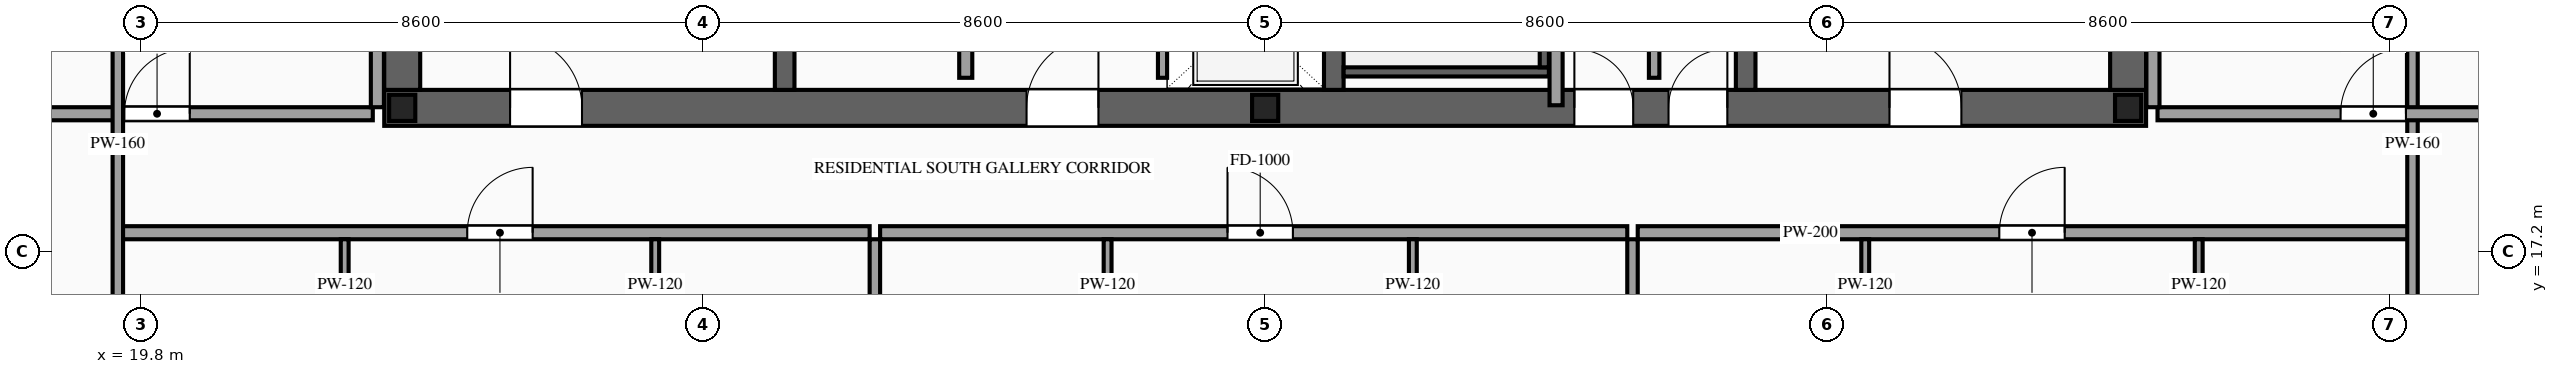
"""IFC4 building model, lengths in metres.
Left out: names, types, materials, properties, quantities, classifications, styles, units other than length and angle.
Written with IfcOpenShell. Run it as: python <this file> out.ifc"""

import sys

from ifc_helpers import new_model, si_unit, direction, frame, frame_2d, origin, origin_2d, place, context, subcontext, project, spatial, rectangle, i_section, extrude, source, transform, mapped, element, fill, save


model = new_model("IFC4")
c1 = context("Model", 3, precision=1e-05, world=origin(), true_north=direction((0.0, 1.0)))
c2 = subcontext(c1, "Body", "Model", "MODEL_VIEW")
j1 = project(units=[si_unit("LENGTHUNIT", "METRE"), si_unit("PLANEANGLEUNIT", "RADIAN")], contexts=[c1])
p1 = place(None, origin())
s1 = spatial("IfcSite", under=j1, at=p1, CompositionType="ELEMENT")
p2 = place(p1, origin())
s2 = spatial("IfcBuilding", under=s1, at=p2, CompositionType="ELEMENT")
p3 = place(p2, frame((0.0, 0.0, 234.6)))
s3 = spatial("IfcBuildingStorey", under=s2, at=p3, CompositionType="ELEMENT", Elevation=234.6)
p4 = place(p3, frame((23.525, 19.4, 0.0), z_axis=(0.0, 0.0, 1.0), x_axis=(1.0, 0.0, 0.0)))
e1 = element("IfcWall", 1, at=p4, inside=s3, PredefinedType="SHEAR", context=c2, shape_type="SweptSolid", body=[
    extrude(rectangle(XDim=26.95, YDim=0.55, at=frame_2d((13.475, 0.0))), origin(), (0.0, 0.0, 1.0), 3.5),
])
p5 = place(p4, frame((1.925, 0.0, 0.0)))
e2 = element("IfcOpeningElement", 2, at=p5, cuts=e1, PredefinedType="OPENING", context=c2, shape_type="SweptSolid", body=[
    extrude(rectangle(XDim=1.1, YDim=2.2, at=frame_2d((0.55, 1.1))), frame((0.0, 0.29, 0.0), z_axis=(0.0, -1.0, 0.0), x_axis=(1.0, 0.0, 0.0)), (0.0, 0.0, 1.0), 0.58),
])
p6 = place(p4, frame((9.825, 0.0, 0.0)))
e3 = element("IfcOpeningElement", 3, at=p6, cuts=e1, PredefinedType="OPENING", context=c2, shape_type="SweptSolid", body=[
    extrude(rectangle(XDim=1.1, YDim=2.2, at=frame_2d((0.55, 1.1))), frame((0.0, 0.29, 0.0), z_axis=(0.0, -1.0, 0.0), x_axis=(1.0, 0.0, 0.0)), (0.0, 0.0, 1.0), 0.58),
])
p7 = place(p4, frame((23.025, 0.0, 0.0)))
e4 = element("IfcOpeningElement", 4, at=p7, cuts=e1, PredefinedType="OPENING", context=c2, shape_type="SweptSolid", body=[
    extrude(rectangle(XDim=1.1, YDim=2.2, at=frame_2d((0.55, 1.1))), frame((0.0, 0.29, 0.0), z_axis=(0.0, -1.0, 0.0), x_axis=(1.0, 0.0, 0.0)), (0.0, 0.0, 1.0), 0.58),
])
p8 = place(p4, frame((19.645, 0.0, 0.0)))
e5 = element("IfcOpeningElement", 5, at=p8, cuts=e1, PredefinedType="OPENING", context=c2, shape_type="SweptSolid", body=[
    extrude(rectangle(XDim=0.9, YDim=2.15, at=frame_2d((0.45, 1.075))), frame((0.0, 0.29, 0.0), z_axis=(0.0, -1.0, 0.0), x_axis=(1.0, 0.0, 0.0)), (0.0, 0.0, 1.0), 0.58),
])
p9 = place(p4, frame((18.205, 0.0, 0.0)))
e6 = element("IfcOpeningElement", 6, at=p9, cuts=e1, PredefinedType="OPENING", context=c2, shape_type="SweptSolid", body=[
    extrude(rectangle(XDim=0.9, YDim=2.15, at=frame_2d((0.45, 1.075))), frame((0.0, 0.29, 0.0), z_axis=(0.0, -1.0, 0.0), x_axis=(1.0, 0.0, 0.0)), (0.0, 0.0, 1.0), 0.58),
])
m1 = source(origin(), c2, "Body", "SweptSolid", [
    extrude(rectangle(XDim=12.25, YDim=0.55, at=frame_2d((6.125, 0.0))), origin(), (0.0, 0.0, 1.0), 3.5),
])
for number, where, z_axis, x_axis in (
    (7, (23.8, 19.675, 0.0), (0.0, 0.0, 1.0), (0.0, 1.0, 0.0)),
    (8, (50.2, 19.675, 0.0), (0.0, 0.0, 1.0), (0.0, 1.0, 0.0)),
):
    element("IfcWall", number, at=place(p3, frame(where, z_axis=z_axis, x_axis=x_axis)), inside=s3, PredefinedType="SHEAR", context=c2, shape_type="MappedRepresentation", body=[
        mapped(m1, transform((0.0, 0.0, 0.0), scale=1.0)),
    ])
m2 = source(origin(), c2, "Body", "SweptSolid", [
    extrude(rectangle(XDim=12.25, YDim=0.3, at=frame_2d((6.125, 0.0))), origin(), (0.0, 0.0, 1.0), 3.5),
])
for number, where, z_axis, x_axis in (
    (9, (29.65, 19.675, 0.0), (0.0, 0.0, 1.0), (0.0, 1.0, 0.0)),
    (10, (38.05, 19.675, 0.0), (0.0, 0.0, 1.0), (0.0, 1.0, 0.0)),
    (11, (44.35, 19.675, 0.0), (0.0, 0.0, 1.0), (0.0, 1.0, 0.0)),
):
    element("IfcWall", number, at=place(p3, frame(where, z_axis=z_axis, x_axis=x_axis)), inside=s3, PredefinedType="SOLIDWALL", context=c2, shape_type="MappedRepresentation", body=[
        mapped(m2, transform((0.0, 0.0, 0.0), scale=1.0)),
    ])
m3 = source(origin(), c2, "Body", "SweptSolid", [
    extrude(i_section(OverallWidth=0.4, OverallDepth=0.4, WebThickness=0.013, FlangeThickness=0.021, at=origin_2d()), origin(), (0.0, 0.0, 1.0), 3.5),
])
for number, where, z_axis, x_axis in (
    (12, (23.8, 19.4, 0.0), (0.0, 0.0, 1.0), (1.0, 0.0, 0.0)),
    (13, (37.0, 19.4, 0.0), (0.0, 0.0, 1.0), (1.0, 0.0, 0.0)),
    (14, (50.2, 19.4, 0.0), (0.0, 0.0, 1.0), (1.0, 0.0, 0.0)),
):
    element("IfcColumn", number, at=place(p3, frame(where, z_axis=z_axis, x_axis=x_axis)), inside=s3, PredefinedType="COLUMN", context=c2, shape_type="MappedRepresentation", body=[
        mapped(m3, transform((0.0, 0.0, 0.0), scale=1.0)),
    ])
p10 = place(p3, frame((35.43, 19.86, 0.0), z_axis=(0.0, 0.0, 1.0), x_axis=(0.0, 1.0, 0.0)))
e15 = element("IfcWall", 15, at=p10, inside=s3, PredefinedType="SOLIDWALL", context=c2, shape_type="SweptSolid", body=[
    extrude(rectangle(XDim=2.04, YDim=0.14, at=frame_2d((1.02, 0.0))), origin(), (0.0, 0.0, 1.0), 3.28),
])
p11 = place(p10, frame((0.47, 0.0, 0.0)))
e16 = element("IfcOpeningElement", 16, at=p11, cuts=e15, PredefinedType="OPENING", context=c2, shape_type="SweptSolid", body=[
    extrude(rectangle(XDim=1.1, YDim=2.2, at=frame_2d((0.55, 1.1))), frame((0.0, 0.085, 0.0), z_axis=(0.0, -1.0, 0.0), x_axis=(1.0, 0.0, 0.0)), (0.0, 0.0, 1.0), 0.17),
])
m4 = source(origin(), c2, "Body", "SweptSolid", [
    extrude(rectangle(XDim=3.14, YDim=0.14, at=frame_2d((1.57, 0.0))), origin(), (0.0, 0.0, 1.0), 3.28),
])
p12 = place(p3, frame((38.2, 19.95, 0.0), z_axis=(0.0, 0.0, 1.0), x_axis=(1.0, 0.0, 0.0)))
e17 = element("IfcWall", 17, at=p12, inside=s3, PredefinedType="SOLIDWALL", context=c2, shape_type="MappedRepresentation", body=[
    mapped(m4, transform((0.0, 0.0, 0.0), scale=1.0)),
])
m5 = source(origin(), c2, "Body", "SweptSolid", [
    extrude(rectangle(XDim=8.94, YDim=0.14, at=frame_2d((4.47, 0.0))), origin(), (0.0, 0.0, 1.0), 3.28),
])
p13 = place(p3, frame((41.27, 20.02, 0.0), z_axis=(0.0, 0.0, 1.0), x_axis=(0.0, 1.0, 0.0)))
e18 = element("IfcWall", 18, at=p13, inside=s3, PredefinedType="SOLIDWALL", context=c2, shape_type="MappedRepresentation", body=[
    mapped(m5, transform((0.0, 0.0, 0.0), scale=1.0)),
])
p14 = place(p3, frame((32.42, 19.86, 0.0), z_axis=(0.0, 0.0, 1.0), x_axis=(0.0, 1.0, 0.0)))
e19 = element("IfcWall", 19, at=p14, inside=s3, PredefinedType="PARTITIONING", context=c2, shape_type="SweptSolid", body=[
    extrude(rectangle(XDim=7.94, YDim=0.2, at=frame_2d((3.97, 0.0))), origin(), (0.0, 0.0, 1.0), 3.28),
])
p15 = place(p14, frame((3.52, 0.0, 0.0)))
e20 = element("IfcOpeningElement", 20, at=p15, cuts=e19, PredefinedType="OPENING", context=c2, shape_type="SweptSolid", body=[
    extrude(rectangle(XDim=0.9, YDim=2.15, at=frame_2d((0.45, 1.075))), frame((0.0, 0.115, 0.0), z_axis=(0.0, -1.0, 0.0), x_axis=(1.0, 0.0, 0.0)), (0.0, 0.0, 1.0), 0.23),
])
m6 = source(origin(), c2, "Body", "SweptSolid", [
    extrude(rectangle(XDim=1.34, YDim=0.16, at=frame_2d((0.67, 0.0))), origin(), (0.0, 0.0, 1.0), 3.28),
])
p16 = place(p3, frame((42.95, 19.86, 0.0), z_axis=(0.0, 0.0, 1.0), x_axis=(0.0, 1.0, 0.0)))
e21 = element("IfcWall", 21, at=p16, inside=s3, PredefinedType="PARTITIONING", context=c2, shape_type="MappedRepresentation", body=[
    mapped(m6, transform((0.0, 0.0, 0.0), scale=1.0)),
])
m7 = source(origin(), c2, "Body", "SweptSolid", [
    extrude(rectangle(XDim=6.51, YDim=0.2, at=frame_2d((3.255, 0.0))), origin(), (0.0, 0.0, 1.0), 3.28),
])
p17 = place(p3, frame((41.45, 19.44, 0.0), z_axis=(0.0, 0.0, 1.0), x_axis=(0.0, 1.0, 0.0)))
e22 = element("IfcWall", 22, at=p17, inside=s3, PredefinedType="PARTITIONING", context=c2, shape_type="MappedRepresentation", body=[
    mapped(m7, transform((0.0, 0.0, 0.0), scale=1.0)),
])
p18 = place(p3, frame((19.44, 17.49, 0.0), z_axis=(0.0, 0.0, 1.0), x_axis=(1.0, 0.0, 0.0)))
e23 = element("IfcWall", 23, at=p18, inside=s3, PredefinedType="PARTITIONING", context=c2, shape_type="SweptSolid", body=[
    extrude(rectangle(XDim=11.51, YDim=0.2, at=frame_2d((5.755, 0.0))), origin(), (0.0, 0.0, 1.0), 3.28),
])
p19 = place(p18, frame((5.355, 0.0, 0.0)))
e24 = element("IfcOpeningElement", 24, at=p19, cuts=e23, PredefinedType="OPENING", context=c2, shape_type="SweptSolid", body=[
    extrude(rectangle(XDim=1.0, YDim=2.2, at=frame_2d((0.5, 1.1))), frame((0.0, 0.115, 0.0), z_axis=(0.0, -1.0, 0.0), x_axis=(1.0, 0.0, 0.0)), (0.0, 0.0, 1.0), 0.23),
])
m8 = source(origin(), c2, "Body", "SweptSolid", [
    extrude(rectangle(XDim=12.04, YDim=0.16, at=frame_2d((6.02, 0.0))), origin(), (0.0, 0.0, 1.0), 3.28),
])
p20 = place(p3, frame((31.03, 5.35, 0.0), z_axis=(0.0, 0.0, 1.0), x_axis=(0.0, 1.0, 0.0)))
e25 = element("IfcWall", 25, at=p20, inside=s3, PredefinedType="PARTITIONING", context=c2, shape_type="MappedRepresentation", body=[
    mapped(m8, transform((0.0, 0.0, 0.0), scale=1.0)),
])
p21 = place(p3, frame((22.92, 13.28, 0.0), z_axis=(0.0, 0.0, 1.0), x_axis=(0.0, 1.0, 0.0)))
e26 = element("IfcWall", 26, at=p21, inside=s3, PredefinedType="PARTITIONING", context=c2, shape_type="SweptSolid", body=[
    extrude(rectangle(XDim=4.11, YDim=0.12, at=frame_2d((2.055, 0.0))), origin(), (0.0, 0.0, 1.0), 3.28),
])
p22 = place(p21, frame((1.63, 0.0, 0.0)))
e27 = element("IfcOpeningElement", 27, at=p22, cuts=e26, PredefinedType="OPENING", context=c2, shape_type="SweptSolid", body=[
    extrude(rectangle(XDim=0.85, YDim=2.1, at=frame_2d((0.425, 1.05))), frame((0.0, 0.075, 0.0), z_axis=(0.0, -1.0, 0.0), x_axis=(1.0, 0.0, 0.0)), (0.0, 0.0, 1.0), 0.15),
])
p23 = place(p3, frame((27.67, 13.28, 0.0), z_axis=(0.0, 0.0, 1.0), x_axis=(0.0, 1.0, 0.0)))
e28 = element("IfcWall", 28, at=p23, inside=s3, PredefinedType="PARTITIONING", context=c2, shape_type="SweptSolid", body=[
    extrude(rectangle(XDim=4.11, YDim=0.12, at=frame_2d((2.055, 0.0))), origin(), (0.0, 0.0, 1.0), 3.28),
])
p24 = place(p23, frame((1.63, 0.0, 0.0)))
e29 = element("IfcOpeningElement", 29, at=p24, cuts=e28, PredefinedType="OPENING", context=c2, shape_type="SweptSolid", body=[
    extrude(rectangle(XDim=0.85, YDim=2.1, at=frame_2d((0.425, 1.05))), frame((0.0, 0.075, 0.0), z_axis=(0.0, -1.0, 0.0), x_axis=(1.0, 0.0, 0.0)), (0.0, 0.0, 1.0), 0.15),
])
p25 = place(p3, frame((31.11, 17.49, 0.0), z_axis=(0.0, 0.0, 1.0), x_axis=(1.0, 0.0, 0.0)))
e30 = element("IfcWall", 30, at=p25, inside=s3, PredefinedType="PARTITIONING", context=c2, shape_type="SweptSolid", body=[
    extrude(rectangle(XDim=11.429, YDim=0.2, at=frame_2d((5.714, 0.0))), origin(), (0.0, 0.0, 1.0), 3.28),
])
p26 = place(p25, frame((5.314, 0.0, 0.0)))
e31 = element("IfcOpeningElement", 31, at=p26, cuts=e30, PredefinedType="OPENING", context=c2, shape_type="SweptSolid", body=[
    extrude(rectangle(XDim=1.0, YDim=2.2, at=frame_2d((0.5, 1.1))), frame((0.0, 0.115, 0.0), z_axis=(0.0, -1.0, 0.0), x_axis=(1.0, 0.0, 0.0)), (0.0, 0.0, 1.0), 0.23),
])
p27 = place(p3, frame((42.619, 5.35, 0.0), z_axis=(0.0, 0.0, 1.0), x_axis=(0.0, 1.0, 0.0)))
e32 = element("IfcWall", 32, at=p27, inside=s3, PredefinedType="PARTITIONING", context=c2, shape_type="MappedRepresentation", body=[
    mapped(m8, transform((0.0, 0.0, 0.0), scale=1.0)),
])
p28 = place(p3, frame((34.59, 13.28, 0.0), z_axis=(0.0, 0.0, 1.0), x_axis=(0.0, 1.0, 0.0)))
e33 = element("IfcWall", 33, at=p28, inside=s3, PredefinedType="PARTITIONING", context=c2, shape_type="SweptSolid", body=[
    extrude(rectangle(XDim=4.11, YDim=0.12, at=frame_2d((2.055, 0.0))), origin(), (0.0, 0.0, 1.0), 3.28),
])
p29 = place(p28, frame((1.63, 0.0, 0.0)))
e34 = element("IfcOpeningElement", 34, at=p29, cuts=e33, PredefinedType="OPENING", context=c2, shape_type="SweptSolid", body=[
    extrude(rectangle(XDim=0.85, YDim=2.1, at=frame_2d((0.425, 1.05))), frame((0.0, 0.075, 0.0), z_axis=(0.0, -1.0, 0.0), x_axis=(1.0, 0.0, 0.0)), (0.0, 0.0, 1.0), 0.15),
])
p30 = place(p3, frame((39.259, 13.28, 0.0), z_axis=(0.0, 0.0, 1.0), x_axis=(0.0, 1.0, 0.0)))
e35 = element("IfcWall", 35, at=p30, inside=s3, PredefinedType="PARTITIONING", context=c2, shape_type="SweptSolid", body=[
    extrude(rectangle(XDim=4.11, YDim=0.12, at=frame_2d((2.055, 0.0))), origin(), (0.0, 0.0, 1.0), 3.28),
])
p31 = place(p30, frame((1.63, 0.0, 0.0)))
e36 = element("IfcOpeningElement", 36, at=p31, cuts=e35, PredefinedType="OPENING", context=c2, shape_type="SweptSolid", body=[
    extrude(rectangle(XDim=0.85, YDim=2.1, at=frame_2d((0.425, 1.05))), frame((0.0, 0.075, 0.0), z_axis=(0.0, -1.0, 0.0), x_axis=(1.0, 0.0, 0.0)), (0.0, 0.0, 1.0), 0.15),
])
p32 = place(p3, frame((42.699, 17.49, 0.0), z_axis=(0.0, 0.0, 1.0), x_axis=(1.0, 0.0, 0.0)))
e37 = element("IfcWall", 37, at=p32, inside=s3, PredefinedType="PARTITIONING", context=c2, shape_type="SweptSolid", body=[
    extrude(rectangle(XDim=11.861, YDim=0.2, at=frame_2d((5.931, 0.0))), origin(), (0.0, 0.0, 1.0), 3.28),
])
p33 = place(p32, frame((5.531, 0.0, 0.0)))
e38 = element("IfcOpeningElement", 38, at=p33, cuts=e37, PredefinedType="OPENING", context=c2, shape_type="SweptSolid", body=[
    extrude(rectangle(XDim=1.0, YDim=2.2, at=frame_2d((0.5, 1.1))), frame((0.0, 0.115, 0.0), z_axis=(0.0, -1.0, 0.0), x_axis=(1.0, 0.0, 0.0)), (0.0, 0.0, 1.0), 0.23),
])
p34 = place(p3, frame((46.179, 13.28, 0.0), z_axis=(0.0, 0.0, 1.0), x_axis=(0.0, 1.0, 0.0)))
e39 = element("IfcWall", 39, at=p34, inside=s3, PredefinedType="PARTITIONING", context=c2, shape_type="SweptSolid", body=[
    extrude(rectangle(XDim=4.11, YDim=0.12, at=frame_2d((2.055, 0.0))), origin(), (0.0, 0.0, 1.0), 3.28),
])
p35 = place(p34, frame((1.63, 0.0, 0.0)))
e40 = element("IfcOpeningElement", 40, at=p35, cuts=e39, PredefinedType="OPENING", context=c2, shape_type="SweptSolid", body=[
    extrude(rectangle(XDim=0.85, YDim=2.1, at=frame_2d((0.425, 1.05))), frame((0.0, 0.075, 0.0), z_axis=(0.0, -1.0, 0.0), x_axis=(1.0, 0.0, 0.0)), (0.0, 0.0, 1.0), 0.15),
])
p36 = place(p3, frame((51.28, 13.28, 0.0), z_axis=(0.0, 0.0, 1.0), x_axis=(0.0, 1.0, 0.0)))
e41 = element("IfcWall", 41, at=p36, inside=s3, PredefinedType="PARTITIONING", context=c2, shape_type="SweptSolid", body=[
    extrude(rectangle(XDim=4.11, YDim=0.12, at=frame_2d((2.055, 0.0))), origin(), (0.0, 0.0, 1.0), 3.28),
])
p37 = place(p36, frame((1.63, 0.0, 0.0)))
e42 = element("IfcOpeningElement", 42, at=p37, cuts=e41, PredefinedType="OPENING", context=c2, shape_type="SweptSolid", body=[
    extrude(rectangle(XDim=0.85, YDim=2.1, at=frame_2d((0.425, 1.05))), frame((0.0, 0.075, 0.0), z_axis=(0.0, -1.0, 0.0), x_axis=(1.0, 0.0, 0.0)), (0.0, 0.0, 1.0), 0.15),
])
p38 = place(p3, frame((16.55, 19.31, 0.0), z_axis=(0.0, 0.0, 1.0), x_axis=(1.0, 0.0, 0.0)))
e43 = element("IfcWall", 43, at=p38, inside=s3, PredefinedType="PARTITIONING", context=c2, shape_type="SweptSolid", body=[
    extrude(rectangle(XDim=6.8, YDim=0.2, at=frame_2d((3.4, 0.0))), origin(), (0.0, 0.0, 1.0), 2.825),
])
p39 = place(p38, frame((3.0, 0.0, 0.0)))
e44 = element("IfcOpeningElement", 44, at=p39, cuts=e43, PredefinedType="OPENING", context=c2, shape_type="SweptSolid", body=[
    extrude(rectangle(XDim=1.0, YDim=2.2, at=frame_2d((0.5, 1.1))), frame((0.0, 0.115, 0.0), z_axis=(0.0, -1.0, 0.0), x_axis=(1.0, 0.0, 0.0)), (0.0, 0.0, 1.0), 0.23),
])
m9 = source(origin(), c2, "Body", "SweptSolid", [
    extrude(rectangle(XDim=6.29, YDim=0.2, at=frame_2d((3.145, 0.0))), origin(), (0.0, 0.0, 1.0), 3.28),
])
p40 = place(p3, frame((23.42, 19.41, 0.0), z_axis=(0.0, 0.0, 1.0), x_axis=(0.0, 1.0, 0.0)))
e45 = element("IfcWall", 45, at=p40, inside=s3, PredefinedType="PARTITIONING", context=c2, shape_type="MappedRepresentation", body=[
    mapped(m9, transform((0.0, 0.0, 0.0), scale=1.0)),
])
m10 = source(origin(), c2, "Body", "SweptSolid", [
    extrude(rectangle(XDim=26.69, YDim=0.16, at=frame_2d((13.345, 0.0))), origin(), (0.0, 0.0, 1.0), 3.28),
])
for number, where, z_axis, x_axis in (
    (46, (19.45, 5.5, 0.0), (0.0, 0.0, 1.0), (0.0, 1.0, 0.0)),
    (47, (54.55, 5.5, 0.0), (0.0, 0.0, 1.0), (0.0, 1.0, 0.0)),
):
    element("IfcWall", number, at=place(p3, frame(where, z_axis=z_axis, x_axis=x_axis)), inside=s3, PredefinedType="PARTITIONING", context=c2, shape_type="MappedRepresentation", body=[
        mapped(m10, transform((0.0, 0.0, 0.0), scale=1.0)),
    ])
p41 = place(p3, frame((50.65, 19.31, 0.0), z_axis=(0.0, 0.0, 1.0), x_axis=(1.0, 0.0, 0.0)))
e48 = element("IfcWall", 48, at=p41, inside=s3, PredefinedType="PARTITIONING", context=c2, shape_type="SweptSolid", body=[
    extrude(rectangle(XDim=6.8, YDim=0.2, at=frame_2d((3.4, 0.0))), origin(), (0.0, 0.0, 1.0), 2.825),
])
p42 = place(p41, frame((2.8, 0.0, 0.0)))
e49 = element("IfcOpeningElement", 49, at=p42, cuts=e48, PredefinedType="OPENING", context=c2, shape_type="SweptSolid", body=[
    extrude(rectangle(XDim=1.0, YDim=2.2, at=frame_2d((0.5, 1.1))), frame((0.0, 0.115, 0.0), z_axis=(0.0, -1.0, 0.0), x_axis=(1.0, 0.0, 0.0)), (0.0, 0.0, 1.0), 0.23),
])
p43 = place(p3, frame((50.58, 19.41, 0.0), z_axis=(0.0, 0.0, 1.0), x_axis=(0.0, 1.0, 0.0)))
e50 = element("IfcWall", 50, at=p43, inside=s3, PredefinedType="PARTITIONING", context=c2, shape_type="MappedRepresentation", body=[
    mapped(m9, transform((0.0, 0.0, 0.0), scale=1.0)),
])
m11 = source(origin(), c2, "Body", "SweptSolid", [
    extrude(rectangle(XDim=1.1, YDim=2.2, at=frame_2d((0.55, 1.1))), frame((0.0, 0.025, 0.0), z_axis=(0.0, -1.0, 0.0), x_axis=(1.0, 0.0, 0.0)), (0.0, 0.0, 1.0), 0.05),
])
p44 = place(p5, origin())
e51 = element("IfcDoor", 51, at=p44, inside=s3, OperationType="SINGLE_SWING_LEFT", PredefinedType="DOOR", context=c2, shape_type="MappedRepresentation", body=[
    mapped(m11, transform((0.0, 0.0, 0.0), scale=1.0)),
])
fill(e2, e51)
p45 = place(p6, origin())
e52 = element("IfcDoor", 52, at=p45, inside=s3, OperationType="SINGLE_SWING_RIGHT", PredefinedType="DOOR", context=c2, shape_type="MappedRepresentation", body=[
    mapped(m11, transform((0.0, 0.0, 0.0), scale=1.0)),
])
fill(e3, e52)
p46 = place(p7, origin())
e53 = element("IfcDoor", 53, at=p46, inside=s3, OperationType="SINGLE_SWING_LEFT", PredefinedType="DOOR", context=c2, shape_type="MappedRepresentation", body=[
    mapped(m11, transform((0.0, 0.0, 0.0), scale=1.0)),
])
fill(e4, e53)
m12 = source(origin(), c2, "Body", "SweptSolid", [
    extrude(rectangle(XDim=0.9, YDim=2.15, at=frame_2d((0.45, 1.075))), frame((0.0, 0.025, 0.0), z_axis=(0.0, -1.0, 0.0), x_axis=(1.0, 0.0, 0.0)), (0.0, 0.0, 1.0), 0.05),
])
p47 = place(p8, origin())
e54 = element("IfcDoor", 54, at=p47, inside=s3, OperationType="SINGLE_SWING_RIGHT", PredefinedType="DOOR", context=c2, shape_type="MappedRepresentation", body=[
    mapped(m12, transform((0.0, 0.0, 0.0), scale=1.0)),
])
fill(e5, e54)
p48 = place(p9, origin())
e55 = element("IfcDoor", 55, at=p48, inside=s3, OperationType="SINGLE_SWING_LEFT", PredefinedType="DOOR", context=c2, shape_type="MappedRepresentation", body=[
    mapped(m12, transform((0.0, 0.0, 0.0), scale=1.0)),
])
fill(e6, e55)
m13 = source(origin(), c2, "Body", "SweptSolid", [
    extrude(rectangle(XDim=1.0, YDim=2.2, at=frame_2d((0.5, 1.1))), frame((0.0, 0.025, 0.0), z_axis=(0.0, -1.0, 0.0), x_axis=(1.0, 0.0, 0.0)), (0.0, 0.0, 1.0), 0.05),
])
p49 = place(p19, origin())
e56 = element("IfcDoor", 56, at=p49, inside=s3, OperationType="SINGLE_SWING_RIGHT", PredefinedType="DOOR", context=c2, shape_type="MappedRepresentation", body=[
    mapped(m13, transform((0.0, 0.0, 0.0), scale=1.0)),
])
fill(e24, e56)
p50 = place(p26, origin())
e57 = element("IfcDoor", 57, at=p50, inside=s3, OperationType="SINGLE_SWING_LEFT", PredefinedType="DOOR", context=c2, shape_type="MappedRepresentation", body=[
    mapped(m13, transform((0.0, 0.0, 0.0), scale=1.0)),
])
fill(e31, e57)
p51 = place(p33, origin())
e58 = element("IfcDoor", 58, at=p51, inside=s3, OperationType="SINGLE_SWING_RIGHT", PredefinedType="DOOR", context=c2, shape_type="MappedRepresentation", body=[
    mapped(m13, transform((0.0, 0.0, 0.0), scale=1.0)),
])
fill(e38, e58)
p52 = place(p39, origin())
e59 = element("IfcDoor", 59, at=p52, inside=s3, OperationType="SINGLE_SWING_RIGHT", PredefinedType="DOOR", context=c2, shape_type="MappedRepresentation", body=[
    mapped(m13, transform((0.0, 0.0, 0.0), scale=1.0)),
])
fill(e44, e59)
p53 = place(p42, origin())
e60 = element("IfcDoor", 60, at=p53, inside=s3, OperationType="SINGLE_SWING_RIGHT", PredefinedType="DOOR", context=c2, shape_type="MappedRepresentation", body=[
    mapped(m13, transform((0.0, 0.0, 0.0), scale=1.0)),
])
fill(e49, e60)
save(model, sys.argv[1])
